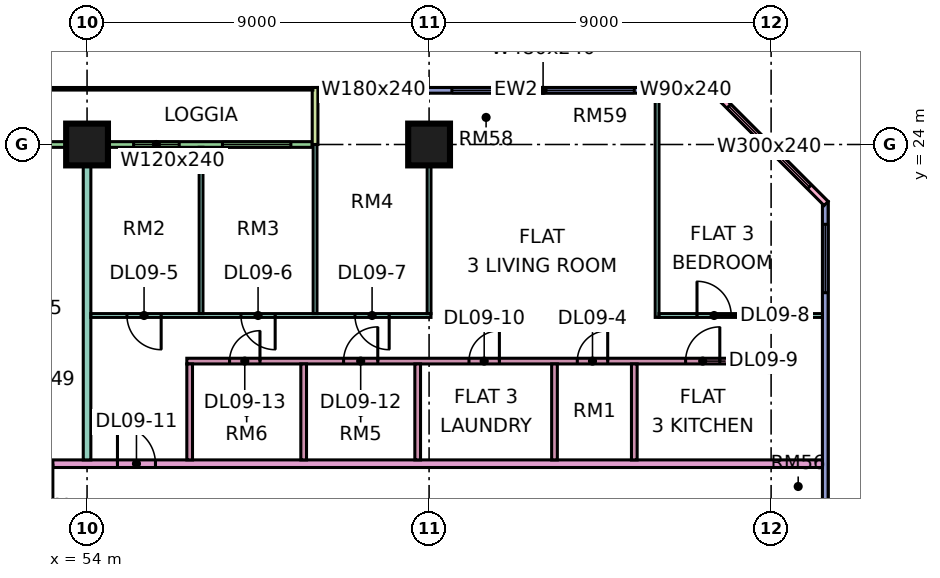
"""IFC4 building model, lengths in metres.
Left out: names, types, materials, properties, quantities, classifications, styles, units other than length and angle.
Written with IfcOpenShell. Run it as: python <this file> out.ifc"""

import sys

from ifc_helpers import new_model, si_unit, direction, frame, frame_2d, origin, origin_2d, place, context, subcontext, project, spatial, rectangle, extrude, element, fill, save


model = new_model("IFC4")
c1 = context("Model", 3, precision=1e-05, world=origin(), true_north=direction((0.0, 1.0)))
c2 = subcontext(c1, "Body", "Model", "MODEL_VIEW")
j1 = project(units=[si_unit("LENGTHUNIT", "METRE"), si_unit("PLANEANGLEUNIT", "RADIAN")], contexts=[c1])
p1 = place(None, origin())
s1 = spatial("IfcSite", under=j1, at=p1, CompositionType="ELEMENT")
p2 = place(p1, origin())
s2 = spatial("IfcBuilding", under=s1, at=p2, CompositionType="ELEMENT")
p3 = place(p2, frame((0.0, 0.0, 48.9)))
s3 = spatial("IfcBuildingStorey", under=s2, at=p3, CompositionType="ELEMENT", Elevation=48.9)
for number, where, z_axis, x_axis in (
    (1, (54.0, 24.0, 0.0), (0.0, 0.0, 1.0), (1.0, 0.0, 0.0)),
    (2, (63.0, 24.0, 0.0), (0.0, 0.0, 1.0), (1.0, 0.0, 0.0)),
):
    element("IfcColumn", number, at=place(p3, frame(where, z_axis=z_axis, x_axis=x_axis)), inside=s3, PredefinedType="COLUMN", context=c2, shape_type="SweptSolid", body=[
        extrude(rectangle(XDim=1.1, YDim=1.1, at=origin_2d()), origin(), (0.0, 0.0, 1.0), 3.75),
    ])
p4 = place(p3, frame((70.5, 25.425, 0.0), z_axis=(0.0, 0.0, 1.0), x_axis=(-1.0, 0.0, 0.0)))
e3 = element("IfcWall", 3, at=p4, inside=s3, PredefinedType="SOLIDWALL", context=c2, shape_type="SweptSolid", body=[
    extrude(rectangle(XDim=10.425, YDim=0.15, at=frame_2d((5.212, 0.0))), origin(), (0.0, 0.0, 1.0), 3.35),
])
p5 = place(p4, frame((0.3, 0.0, 0.45)))
e4 = element("IfcOpeningElement", 4, at=p5, cuts=e3, PredefinedType="OPENING", context=c2, shape_type="SweptSolid", body=[
    extrude(rectangle(XDim=0.9, YDim=2.4, at=frame_2d((0.45, 1.2))), frame((0.0, 0.085, 0.0), z_axis=(0.0, -1.0, 0.0), x_axis=(1.0, 0.0, 0.0)), (0.0, 0.0, 1.0), 0.17),
])
p6 = place(p4, frame((2.1, 0.0, 0.45)))
e5 = element("IfcOpeningElement", 5, at=p6, cuts=e3, PredefinedType="OPENING", context=c2, shape_type="SweptSolid", body=[
    extrude(rectangle(XDim=4.8, YDim=2.4, at=frame_2d((2.4, 1.2))), frame((0.0, 0.085, 0.0), z_axis=(0.0, -1.0, 0.0), x_axis=(1.0, 0.0, 0.0)), (0.0, 0.0, 1.0), 0.17),
])
p7 = place(p4, frame((8.062, 0.0, 0.45)))
e6 = element("IfcOpeningElement", 6, at=p7, cuts=e3, PredefinedType="OPENING", context=c2, shape_type="SweptSolid", body=[
    extrude(rectangle(XDim=1.8, YDim=2.4, at=frame_2d((0.9, 1.2))), frame((0.0, 0.085, 0.0), z_axis=(0.0, -1.0, 0.0), x_axis=(1.0, 0.0, 0.0)), (0.0, 0.0, 1.0), 0.17),
])
p8 = place(p3, frame((59.925, 24.0, 0.0), z_axis=(0.0, 0.0, 1.0), x_axis=(-1.0, 0.0, 0.0)))
e7 = element("IfcWall", 7, at=p8, inside=s3, PredefinedType="SOLIDWALL", context=c2, shape_type="SweptSolid", body=[
    extrude(rectangle(XDim=11.85, YDim=0.15, at=frame_2d((5.925, 0.0))), origin(), (0.0, 0.0, 1.0), 3.35),
])
p9 = place(p8, frame((0.562, 0.0, 0.45)))
e8 = element("IfcOpeningElement", 8, at=p9, cuts=e7, PredefinedType="OPENING", context=c2, shape_type="SweptSolid", body=[
    extrude(rectangle(XDim=1.8, YDim=2.4, at=frame_2d((0.9, 1.2))), frame((0.0, 0.085, 0.0), z_axis=(0.0, -1.0, 0.0), x_axis=(1.0, 0.0, 0.0)), (0.0, 0.0, 1.0), 0.17),
])
p10 = place(p8, frame((3.5, 0.0, 0.45)))
e9 = element("IfcOpeningElement", 9, at=p10, cuts=e7, PredefinedType="OPENING", context=c2, shape_type="SweptSolid", body=[
    extrude(rectangle(XDim=1.2, YDim=2.4, at=frame_2d((0.6, 1.2))), frame((0.0, 0.085, 0.0), z_axis=(0.0, -1.0, 0.0), x_axis=(1.0, 0.0, 0.0)), (0.0, 0.0, 1.0), 0.17),
])
p11 = place(p8, frame((7.113, 0.0, 0.45)))
e10 = element("IfcOpeningElement", 10, at=p11, cuts=e7, PredefinedType="OPENING", context=c2, shape_type="SweptSolid", body=[
    extrude(rectangle(XDim=4.2, YDim=2.4, at=frame_2d((2.1, 1.2))), frame((0.0, 0.085, 0.0), z_axis=(0.0, -1.0, 0.0), x_axis=(1.0, 0.0, 0.0)), (0.0, 0.0, 1.0), 0.17),
])
p12 = place(p3, frame((60.0, 25.5, 0.0), z_axis=(0.0, 0.0, 1.0), x_axis=(0.0, -1.0, 0.0)))
e11 = element("IfcWall", 11, at=p12, inside=s3, PredefinedType="SOLIDWALL", context=c2, shape_type="SweptSolid", body=[
    extrude(rectangle(XDim=1.5, YDim=0.15, at=frame_2d((0.75, 0.0))), origin(), (0.0, 0.0, 1.0), 3.35),
])
p13 = place(p3, frame((73.425, 12.075, 0.0), z_axis=(0.0, 0.0, 1.0), x_axis=(0.0, 1.0, 0.0)))
e12 = element("IfcWall", 12, at=p13, inside=s3, PredefinedType="SOLIDWALL", context=c2, shape_type="SweptSolid", body=[
    extrude(rectangle(XDim=10.425, YDim=0.15, at=frame_2d((5.212, 0.0))), origin(), (0.0, 0.0, 1.0), 3.35),
])
p14 = place(p13, frame((8.025, 0.0, 0.45)))
e13 = element("IfcOpeningElement", 13, at=p14, cuts=e12, PredefinedType="OPENING", context=c2, shape_type="SweptSolid", body=[
    extrude(rectangle(XDim=1.8, YDim=2.4, at=frame_2d((0.9, 1.2))), frame((0.0, 0.085, 0.0), z_axis=(0.0, -1.0, 0.0), x_axis=(1.0, 0.0, 0.0)), (0.0, 0.0, 1.0), 0.17),
])
p15 = place(p3, frame((73.447, 22.447, 0.0), z_axis=(0.0, 0.0, 1.0), x_axis=(-0.707106781187, 0.707106781187, 0.0)))
e14 = element("IfcWall", 14, at=p15, inside=s3, PredefinedType="SOLIDWALL", context=c2, shape_type="SweptSolid", body=[
    extrude(rectangle(XDim=4.243, YDim=0.15, at=frame_2d((2.121, 0.0))), origin(), (0.0, 0.0, 1.0), 3.35),
])
p16 = place(p15, frame((0.621, 0.0, 0.45)))
e15 = element("IfcOpeningElement", 15, at=p16, cuts=e14, PredefinedType="OPENING", context=c2, shape_type="SweptSolid", body=[
    extrude(rectangle(XDim=3.0, YDim=2.4, at=frame_2d((1.5, 1.2))), frame((0.0, 0.085, 0.0), z_axis=(0.0, -1.0, 0.0), x_axis=(1.0, 0.0, 0.0)), (0.0, 0.0, 1.0), 0.17),
])
p17 = place(p3, frame((51.225, 15.6, 0.0), z_axis=(0.0, 0.0, 1.0), x_axis=(1.0, 0.0, 0.0)))
e16 = element("IfcWall", 16, at=p17, inside=s3, PredefinedType="PARTITIONING", context=c2, shape_type="SweptSolid", body=[
    extrude(rectangle(XDim=22.125, YDim=0.2, at=frame_2d((11.062, 0.0))), origin(), (0.0, 0.0, 1.0), 3.35),
])
p18 = place(p17, frame((3.575, 0.0, 0.0)))
e17 = element("IfcOpeningElement", 17, at=p18, cuts=e16, PredefinedType="OPENING", context=c2, shape_type="SweptSolid", body=[
    extrude(rectangle(XDim=1.0, YDim=2.1, at=frame_2d((0.5, 1.05))), frame((0.0, 0.11, 0.0), z_axis=(0.0, -1.0, 0.0), x_axis=(1.0, 0.0, 0.0)), (0.0, 0.0, 1.0), 0.22),
])
p19 = place(p17, frame((0.875, 0.0, 0.0)))
e18 = element("IfcOpeningElement", 18, at=p19, cuts=e16, PredefinedType="OPENING", context=c2, shape_type="SweptSolid", body=[
    extrude(rectangle(XDim=1.0, YDim=2.1, at=frame_2d((0.5, 1.05))), frame((0.0, 0.11, 0.0), z_axis=(0.0, -1.0, 0.0), x_axis=(1.0, 0.0, 0.0)), (0.0, 0.0, 1.0), 0.22),
])
p20 = place(p3, frame((54.0, 15.7, 0.0), z_axis=(0.0, 0.0, 1.0), x_axis=(0.0, 1.0, 0.0)))
e19 = element("IfcWall", 19, at=p20, inside=s3, PredefinedType="PARTITIONING", context=c2, shape_type="SweptSolid", body=[
    extrude(rectangle(XDim=8.226, YDim=0.2, at=frame_2d((4.113, 0.0))), origin(), (0.0, 0.0, 1.0), 3.35),
])
p21 = place(p3, frame((54.1, 19.5, 0.0), z_axis=(0.0, 0.0, 1.0), x_axis=(1.0, 0.0, 0.0)))
e20 = element("IfcWall", 20, at=p21, inside=s3, PredefinedType="PARTITIONING", context=c2, shape_type="SweptSolid", body=[
    extrude(rectangle(XDim=8.95, YDim=0.1, at=frame_2d((4.475, 0.0))), origin(), (0.0, 0.0, 1.0), 3.35),
])
p22 = place(p21, frame((0.95, 0.0, 0.0)))
e21 = element("IfcOpeningElement", 21, at=p22, cuts=e20, PredefinedType="OPENING", context=c2, shape_type="SweptSolid", body=[
    extrude(rectangle(XDim=0.9, YDim=2.1, at=frame_2d((0.45, 1.05))), frame((0.0, 0.06, 0.0), z_axis=(0.0, -1.0, 0.0), x_axis=(1.0, 0.0, 0.0)), (0.0, 0.0, 1.0), 0.12),
])
p23 = place(p21, frame((3.95, 0.0, 0.0)))
e22 = element("IfcOpeningElement", 22, at=p23, cuts=e20, PredefinedType="OPENING", context=c2, shape_type="SweptSolid", body=[
    extrude(rectangle(XDim=0.9, YDim=2.1, at=frame_2d((0.45, 1.05))), frame((0.0, 0.06, 0.0), z_axis=(0.0, -1.0, 0.0), x_axis=(1.0, 0.0, 0.0)), (0.0, 0.0, 1.0), 0.12),
])
p24 = place(p21, frame((6.95, 0.0, 0.0)))
e23 = element("IfcOpeningElement", 23, at=p24, cuts=e20, PredefinedType="OPENING", context=c2, shape_type="SweptSolid", body=[
    extrude(rectangle(XDim=0.9, YDim=2.1, at=frame_2d((0.45, 1.05))), frame((0.0, 0.06, 0.0), z_axis=(0.0, -1.0, 0.0), x_axis=(1.0, 0.0, 0.0)), (0.0, 0.0, 1.0), 0.12),
])
p25 = place(p3, frame((56.625, 18.3, 0.0), z_axis=(0.0, 0.0, 1.0), x_axis=(1.0, 0.0, 0.0)))
e24 = element("IfcWall", 24, at=p25, inside=s3, PredefinedType="PARTITIONING", context=c2, shape_type="SweptSolid", body=[
    extrude(rectangle(XDim=15.425, YDim=0.15, at=frame_2d((7.712, 0.0))), origin(), (0.0, 0.0, 1.0), 3.35),
])
p26 = place(p25, frame((10.275, 0.0, 0.0)))
e25 = element("IfcOpeningElement", 25, at=p26, cuts=e24, PredefinedType="OPENING", context=c2, shape_type="SweptSolid", body=[
    extrude(rectangle(XDim=0.8, YDim=2.1, at=frame_2d((0.4, 1.05))), frame((0.0, 0.085, 0.0), z_axis=(0.0, -1.0, 0.0), x_axis=(1.0, 0.0, 0.0)), (0.0, 0.0, 1.0), 0.17),
])
p27 = place(p25, frame((13.125, 0.0, 0.0)))
e26 = element("IfcOpeningElement", 26, at=p27, cuts=e24, PredefinedType="OPENING", context=c2, shape_type="SweptSolid", body=[
    extrude(rectangle(XDim=0.9, YDim=2.1, at=frame_2d((0.45, 1.05))), frame((0.0, 0.085, 0.0), z_axis=(0.0, -1.0, 0.0), x_axis=(1.0, 0.0, 0.0)), (0.0, 0.0, 1.0), 0.17),
])
p28 = place(p25, frame((7.425, 0.0, 0.0)))
e27 = element("IfcOpeningElement", 27, at=p28, cuts=e24, PredefinedType="OPENING", context=c2, shape_type="SweptSolid", body=[
    extrude(rectangle(XDim=0.8, YDim=2.1, at=frame_2d((0.4, 1.05))), frame((0.0, 0.085, 0.0), z_axis=(0.0, -1.0, 0.0), x_axis=(1.0, 0.0, 0.0)), (0.0, 0.0, 1.0), 0.17),
])
p29 = place(p25, frame((4.125, 0.0, 0.0)))
e28 = element("IfcOpeningElement", 28, at=p29, cuts=e24, PredefinedType="OPENING", context=c2, shape_type="SweptSolid", body=[
    extrude(rectangle(XDim=0.9, YDim=2.1, at=frame_2d((0.45, 1.05))), frame((0.0, 0.085, 0.0), z_axis=(0.0, -1.0, 0.0), x_axis=(1.0, 0.0, 0.0)), (0.0, 0.0, 1.0), 0.17),
])
p30 = place(p25, frame((1.125, 0.0, 0.0)))
e29 = element("IfcOpeningElement", 29, at=p30, cuts=e24, PredefinedType="OPENING", context=c2, shape_type="SweptSolid", body=[
    extrude(rectangle(XDim=0.8, YDim=2.1, at=frame_2d((0.4, 1.05))), frame((0.0, 0.085, 0.0), z_axis=(0.0, -1.0, 0.0), x_axis=(1.0, 0.0, 0.0)), (0.0, 0.0, 1.0), 0.17),
])
p31 = place(p3, frame((56.7, 15.7, 0.0), z_axis=(0.0, 0.0, 1.0), x_axis=(0.0, 1.0, 0.0)))
e30 = element("IfcWall", 30, at=p31, inside=s3, PredefinedType="PARTITIONING", context=c2, shape_type="SweptSolid", body=[
    extrude(rectangle(XDim=2.525, YDim=0.15, at=frame_2d((1.263, 0.0))), origin(), (0.0, 0.0, 1.0), 3.35),
])
p32 = place(p3, frame((57.0, 19.55, 0.0), z_axis=(0.0, 0.0, 1.0), x_axis=(0.0, 1.0, 0.0)))
e31 = element("IfcWall", 31, at=p32, inside=s3, PredefinedType="PARTITIONING", context=c2, shape_type="SweptSolid", body=[
    extrude(rectangle(XDim=4.376, YDim=0.1, at=frame_2d((2.188, 0.0))), origin(), (0.0, 0.0, 1.0), 3.35),
])
p33 = place(p3, frame((59.7, 15.7, 0.0), z_axis=(0.0, 0.0, 1.0), x_axis=(0.0, 1.0, 0.0)))
e32 = element("IfcWall", 32, at=p33, inside=s3, PredefinedType="PARTITIONING", context=c2, shape_type="SweptSolid", body=[
    extrude(rectangle(XDim=2.525, YDim=0.15, at=frame_2d((1.263, 0.0))), origin(), (0.0, 0.0, 1.0), 3.35),
])
p34 = place(p3, frame((60.0, 19.55, 0.0), z_axis=(0.0, 0.0, 1.0), x_axis=(0.0, 1.0, 0.0)))
e33 = element("IfcWall", 33, at=p34, inside=s3, PredefinedType="PARTITIONING", context=c2, shape_type="SweptSolid", body=[
    extrude(rectangle(XDim=4.45, YDim=0.1, at=frame_2d((2.225, 0.0))), origin(), (0.0, 0.0, 1.0), 3.35),
])
p35 = place(p3, frame((62.7, 15.7, 0.0), z_axis=(0.0, 0.0, 1.0), x_axis=(0.0, 1.0, 0.0)))
e34 = element("IfcWall", 34, at=p35, inside=s3, PredefinedType="PARTITIONING", context=c2, shape_type="SweptSolid", body=[
    extrude(rectangle(XDim=2.525, YDim=0.15, at=frame_2d((1.263, 0.0))), origin(), (0.0, 0.0, 1.0), 3.35),
])
p36 = place(p3, frame((63.0, 19.55, 0.0), z_axis=(0.0, 0.0, 1.0), x_axis=(0.0, 1.0, 0.0)))
e35 = element("IfcWall", 35, at=p36, inside=s3, PredefinedType="PARTITIONING", context=c2, shape_type="SweptSolid", body=[
    extrude(rectangle(XDim=4.45, YDim=0.1, at=frame_2d((2.225, 0.0))), origin(), (0.0, 0.0, 1.0), 3.35),
])
for number, where, z_axis, x_axis in (
    (36, (66.3, 15.7, 0.0), (0.0, 0.0, 1.0), (0.0, 1.0, 0.0)),
    (37, (68.4, 15.7, 0.0), (0.0, 0.0, 1.0), (0.0, 1.0, 0.0)),
):
    element("IfcWall", number, at=place(p3, frame(where, z_axis=z_axis, x_axis=x_axis)), inside=s3, PredefinedType="PARTITIONING", context=c2, shape_type="SweptSolid", body=[
        extrude(rectangle(XDim=2.525, YDim=0.15, at=frame_2d((1.263, 0.0))), origin(), (0.0, 0.0, 1.0), 3.35),
    ])
p37 = place(p3, frame((69.0, 19.45, 0.0), z_axis=(0.0, 0.0, 1.0), x_axis=(0.0, 1.0, 0.0)))
e38 = element("IfcWall", 38, at=p37, inside=s3, PredefinedType="PARTITIONING", context=c2, shape_type="SweptSolid", body=[
    extrude(rectangle(XDim=5.9, YDim=0.1, at=frame_2d((2.95, 0.0))), origin(), (0.0, 0.0, 1.0), 3.35),
])
p38 = place(p3, frame((69.05, 19.5, 0.0), z_axis=(0.0, 0.0, 1.0), x_axis=(1.0, 0.0, 0.0)))
e39 = element("IfcWall", 39, at=p38, inside=s3, PredefinedType="PARTITIONING", context=c2, shape_type="SweptSolid", body=[
    extrude(rectangle(XDim=4.301, YDim=0.1, at=frame_2d((2.15, 0.0))), origin(), (0.0, 0.0, 1.0), 3.35),
])
p39 = place(p38, frame((1.0, 0.0, 0.0)))
e40 = element("IfcOpeningElement", 40, at=p39, cuts=e39, PredefinedType="OPENING", context=c2, shape_type="SweptSolid", body=[
    extrude(rectangle(XDim=0.9, YDim=2.1, at=frame_2d((0.45, 1.05))), frame((0.0, 0.06, 0.0), z_axis=(0.0, -1.0, 0.0), x_axis=(1.0, 0.0, 0.0)), (0.0, 0.0, 1.0), 0.12),
])
p40 = place(p3, frame((72.0, 18.0, 0.0), z_axis=(0.0, 0.0, 1.0), x_axis=(0.0, 1.0, 0.0)))
e41 = element("IfcWall", 41, at=p40, inside=s3, PredefinedType="PARTITIONING", context=c2, shape_type="SweptSolid", body=[
    extrude(rectangle(XDim=0.225, YDim=0.1, at=frame_2d((0.113, 0.0))), origin(), (0.0, 0.0, 1.0), 3.35),
])
p41 = place(p5, origin())
e42 = element("IfcWindow", 42, at=p41, inside=s3, PartitioningType="SINGLE_PANEL", PredefinedType="WINDOW", context=c2, shape_type="SweptSolid", body=[
    extrude(rectangle(XDim=0.9, YDim=2.4, at=frame_2d((0.45, 1.2))), frame((0.0, 0.03, 0.0), z_axis=(0.0, -1.0, 0.0), x_axis=(1.0, 0.0, 0.0)), (0.0, 0.0, 1.0), 0.06),
])
fill(e4, e42)
p42 = place(p6, origin())
e43 = element("IfcWindow", 43, at=p42, inside=s3, PartitioningType="SINGLE_PANEL", PredefinedType="WINDOW", context=c2, shape_type="SweptSolid", body=[
    extrude(rectangle(XDim=4.8, YDim=2.4, at=frame_2d((2.4, 1.2))), frame((0.0, 0.03, 0.0), z_axis=(0.0, -1.0, 0.0), x_axis=(1.0, 0.0, 0.0)), (0.0, 0.0, 1.0), 0.06),
])
fill(e5, e43)
p43 = place(p7, origin())
e44 = element("IfcWindow", 44, at=p43, inside=s3, PartitioningType="SINGLE_PANEL", PredefinedType="WINDOW", context=c2, shape_type="SweptSolid", body=[
    extrude(rectangle(XDim=1.8, YDim=2.4, at=frame_2d((0.9, 1.2))), frame((0.0, 0.03, 0.0), z_axis=(0.0, -1.0, 0.0), x_axis=(1.0, 0.0, 0.0)), (0.0, 0.0, 1.0), 0.06),
])
fill(e6, e44)
p44 = place(p9, origin())
e45 = element("IfcWindow", 45, at=p44, inside=s3, PartitioningType="SINGLE_PANEL", PredefinedType="WINDOW", context=c2, shape_type="SweptSolid", body=[
    extrude(rectangle(XDim=1.8, YDim=2.4, at=frame_2d((0.9, 1.2))), frame((0.0, 0.03, 0.0), z_axis=(0.0, -1.0, 0.0), x_axis=(1.0, 0.0, 0.0)), (0.0, 0.0, 1.0), 0.06),
])
fill(e8, e45)
p45 = place(p10, origin())
e46 = element("IfcWindow", 46, at=p45, inside=s3, PartitioningType="SINGLE_PANEL", PredefinedType="WINDOW", context=c2, shape_type="SweptSolid", body=[
    extrude(rectangle(XDim=1.2, YDim=2.4, at=frame_2d((0.6, 1.2))), frame((0.0, 0.03, 0.0), z_axis=(0.0, -1.0, 0.0), x_axis=(1.0, 0.0, 0.0)), (0.0, 0.0, 1.0), 0.06),
])
fill(e9, e46)
p46 = place(p14, origin())
e47 = element("IfcWindow", 47, at=p46, inside=s3, PartitioningType="SINGLE_PANEL", PredefinedType="WINDOW", context=c2, shape_type="SweptSolid", body=[
    extrude(rectangle(XDim=1.8, YDim=2.4, at=frame_2d((0.9, 1.2))), frame((0.0, 0.03, 0.0), z_axis=(0.0, -1.0, 0.0), x_axis=(1.0, 0.0, 0.0)), (0.0, 0.0, 1.0), 0.06),
])
fill(e13, e47)
p47 = place(p16, origin())
e48 = element("IfcWindow", 48, at=p47, inside=s3, PartitioningType="SINGLE_PANEL", PredefinedType="WINDOW", context=c2, shape_type="SweptSolid", body=[
    extrude(rectangle(XDim=3.0, YDim=2.4, at=frame_2d((1.5, 1.2))), frame((0.0, 0.03, 0.0), z_axis=(0.0, -1.0, 0.0), x_axis=(1.0, 0.0, 0.0)), (0.0, 0.0, 1.0), 0.06),
])
fill(e15, e48)
p48 = place(p26, frame((0.8, 0.0, 0.0), z_axis=(0.0, 0.0, 1.0), x_axis=(-1.0, 0.0, 0.0)))
e49 = element("IfcDoor", 49, at=p48, inside=s3, OperationType="SINGLE_SWING_RIGHT", PredefinedType="DOOR", context=c2, shape_type="SweptSolid", body=[
    extrude(rectangle(XDim=0.8, YDim=2.1, at=frame_2d((0.4, 1.05))), frame((0.0, 0.025, 0.0), z_axis=(0.0, -1.0, 0.0), x_axis=(1.0, 0.0, 0.0)), (0.0, 0.0, 1.0), 0.05),
])
fill(e25, e49)
p49 = place(p22, origin())
e50 = element("IfcDoor", 50, at=p49, inside=s3, OperationType="SINGLE_SWING_RIGHT", PredefinedType="DOOR", context=c2, shape_type="SweptSolid", body=[
    extrude(rectangle(XDim=0.9, YDim=2.1, at=frame_2d((0.45, 1.05))), frame((0.0, 0.025, 0.0), z_axis=(0.0, -1.0, 0.0), x_axis=(1.0, 0.0, 0.0)), (0.0, 0.0, 1.0), 0.05),
])
fill(e21, e50)
p50 = place(p23, origin())
e51 = element("IfcDoor", 51, at=p50, inside=s3, OperationType="SINGLE_SWING_RIGHT", PredefinedType="DOOR", context=c2, shape_type="SweptSolid", body=[
    extrude(rectangle(XDim=0.9, YDim=2.1, at=frame_2d((0.45, 1.05))), frame((0.0, 0.025, 0.0), z_axis=(0.0, -1.0, 0.0), x_axis=(1.0, 0.0, 0.0)), (0.0, 0.0, 1.0), 0.05),
])
fill(e22, e51)
p51 = place(p24, origin())
e52 = element("IfcDoor", 52, at=p51, inside=s3, OperationType="SINGLE_SWING_RIGHT", PredefinedType="DOOR", context=c2, shape_type="SweptSolid", body=[
    extrude(rectangle(XDim=0.9, YDim=2.1, at=frame_2d((0.45, 1.05))), frame((0.0, 0.025, 0.0), z_axis=(0.0, -1.0, 0.0), x_axis=(1.0, 0.0, 0.0)), (0.0, 0.0, 1.0), 0.05),
])
fill(e23, e52)
p52 = place(p39, origin())
e53 = element("IfcDoor", 53, at=p52, inside=s3, OperationType="SINGLE_SWING_LEFT", PredefinedType="DOOR", context=c2, shape_type="SweptSolid", body=[
    extrude(rectangle(XDim=0.9, YDim=2.1, at=frame_2d((0.45, 1.05))), frame((0.0, 0.025, 0.0), z_axis=(0.0, -1.0, 0.0), x_axis=(1.0, 0.0, 0.0)), (0.0, 0.0, 1.0), 0.05),
])
fill(e40, e53)
p53 = place(p27, frame((0.9, 0.0, 0.0), z_axis=(0.0, 0.0, 1.0), x_axis=(-1.0, 0.0, 0.0)))
e54 = element("IfcDoor", 54, at=p53, inside=s3, OperationType="SINGLE_SWING_RIGHT", PredefinedType="DOOR", context=c2, shape_type="SweptSolid", body=[
    extrude(rectangle(XDim=0.9, YDim=2.1, at=frame_2d((0.45, 1.05))), frame((0.0, 0.025, 0.0), z_axis=(0.0, -1.0, 0.0), x_axis=(1.0, 0.0, 0.0)), (0.0, 0.0, 1.0), 0.05),
])
fill(e26, e54)
p54 = place(p28, frame((0.8, 0.0, 0.0), z_axis=(0.0, 0.0, 1.0), x_axis=(-1.0, 0.0, 0.0)))
e55 = element("IfcDoor", 55, at=p54, inside=s3, OperationType="SINGLE_SWING_RIGHT", PredefinedType="DOOR", context=c2, shape_type="SweptSolid", body=[
    extrude(rectangle(XDim=0.8, YDim=2.1, at=frame_2d((0.4, 1.05))), frame((0.0, 0.025, 0.0), z_axis=(0.0, -1.0, 0.0), x_axis=(1.0, 0.0, 0.0)), (0.0, 0.0, 1.0), 0.05),
])
fill(e27, e55)
p55 = place(p18, origin())
e56 = element("IfcDoor", 56, at=p55, inside=s3, OperationType="SINGLE_SWING_LEFT", PredefinedType="DOOR", context=c2, shape_type="SweptSolid", body=[
    extrude(rectangle(XDim=1.0, YDim=2.1, at=frame_2d((0.5, 1.05))), frame((0.0, 0.025, 0.0), z_axis=(0.0, -1.0, 0.0), x_axis=(1.0, 0.0, 0.0)), (0.0, 0.0, 1.0), 0.05),
])
fill(e17, e56)
p56 = place(p29, frame((0.9, 0.0, 0.0), z_axis=(0.0, 0.0, 1.0), x_axis=(-1.0, 0.0, 0.0)))
e57 = element("IfcDoor", 57, at=p56, inside=s3, OperationType="SINGLE_SWING_RIGHT", PredefinedType="DOOR", context=c2, shape_type="SweptSolid", body=[
    extrude(rectangle(XDim=0.9, YDim=2.1, at=frame_2d((0.45, 1.05))), frame((0.0, 0.025, 0.0), z_axis=(0.0, -1.0, 0.0), x_axis=(1.0, 0.0, 0.0)), (0.0, 0.0, 1.0), 0.05),
])
fill(e28, e57)
p57 = place(p30, frame((0.8, 0.0, 0.0), z_axis=(0.0, 0.0, 1.0), x_axis=(-1.0, 0.0, 0.0)))
e58 = element("IfcDoor", 58, at=p57, inside=s3, OperationType="SINGLE_SWING_RIGHT", PredefinedType="DOOR", context=c2, shape_type="SweptSolid", body=[
    extrude(rectangle(XDim=0.8, YDim=2.1, at=frame_2d((0.4, 1.05))), frame((0.0, 0.025, 0.0), z_axis=(0.0, -1.0, 0.0), x_axis=(1.0, 0.0, 0.0)), (0.0, 0.0, 1.0), 0.05),
])
fill(e29, e58)
p58 = place(p19, origin())
e59 = element("IfcDoor", 59, at=p58, inside=s3, OperationType="SINGLE_SWING_RIGHT", PredefinedType="DOOR", context=c2, shape_type="SweptSolid", body=[
    extrude(rectangle(XDim=1.0, YDim=2.1, at=frame_2d((0.5, 1.05))), frame((0.0, 0.025, 0.0), z_axis=(0.0, -1.0, 0.0), x_axis=(1.0, 0.0, 0.0)), (0.0, 0.0, 1.0), 0.05),
])
fill(e18, e59)
save(model, sys.argv[1])
